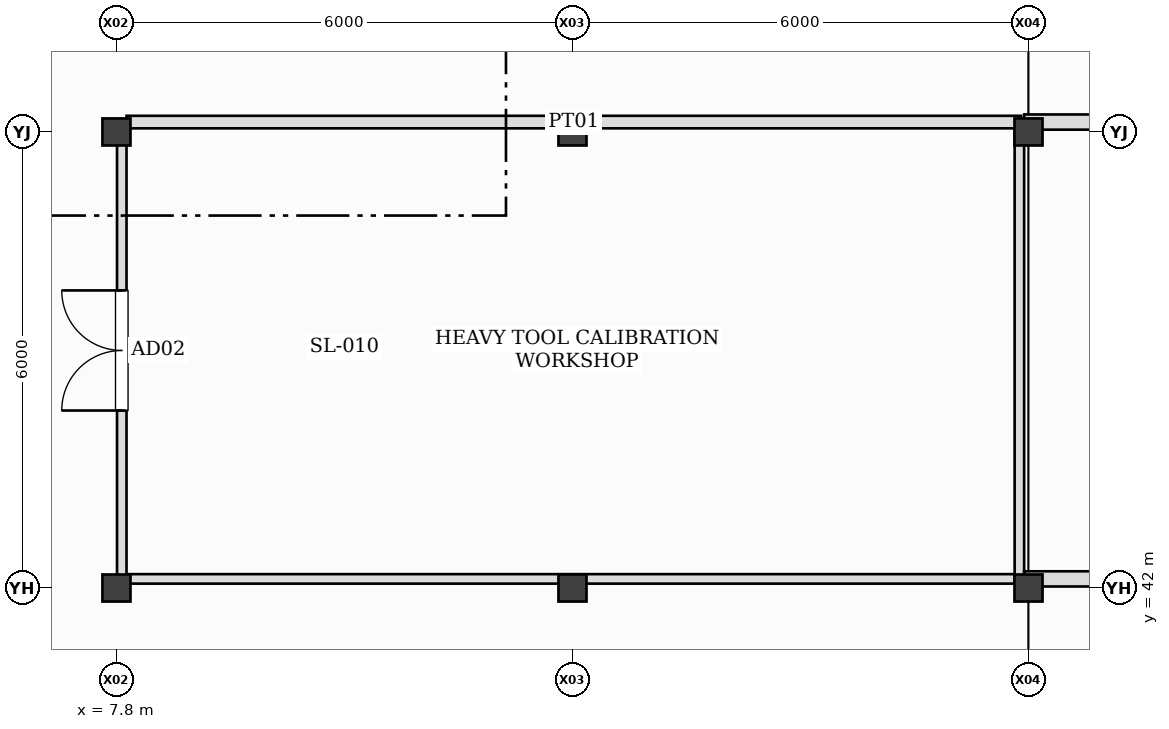
"""IFC4 building model, lengths in metres.
Left out: names, types, materials, properties, quantities, classifications, styles, units other than length and angle.
Written with IfcOpenShell. Run it as: python <this file> out.ifc"""

import sys

from ifc_helpers import new_model, si_unit, direction, frame, frame_2d, origin, origin_2d, place, context, subcontext, project, spatial, rectangle, i_section, extrude, element, fill, save


model = new_model("IFC4")
c1 = context("Model", 3, precision=1e-05, world=origin(), true_north=direction((0.0, 1.0)))
c2 = subcontext(c1, "Body", "Model", "MODEL_VIEW")
j1 = project(units=[si_unit("LENGTHUNIT", "METRE"), si_unit("PLANEANGLEUNIT", "RADIAN")], contexts=[c1])
p1 = place(None, origin())
s1 = spatial("IfcSite", under=j1, at=p1, CompositionType="ELEMENT")
p2 = place(p1, origin())
s2 = spatial("IfcBuilding", under=s1, at=p2, CompositionType="ELEMENT")
p3 = place(p2, origin())
s3 = spatial("IfcBuildingStorey", under=s2, at=p3, CompositionType="ELEMENT", Elevation=0.0)
for number, where, z_axis, x_axis in (
    (1, (7.8, 42.0, -0.41), (0.0, 0.0, 1.0), (1.0, 0.0, 0.0)),
    (2, (7.8, 48.0, -0.41), (0.0, 0.0, 1.0), (1.0, 0.0, 0.0)),
    (3, (13.8, 42.0, -0.41), (0.0, 0.0, 1.0), (1.0, 0.0, 0.0)),
    (4, (13.8, 48.0, -0.41), (0.0, 0.0, 1.0), (1.0, 0.0, 0.0)),
    (5, (19.8, 42.0, -0.41), (0.0, 0.0, 1.0), (1.0, 0.0, 0.0)),
    (6, (19.8, 48.0, -0.41), (0.0, 0.0, 1.0), (1.0, 0.0, 0.0)),
):
    element("IfcColumn", number, at=place(p3, frame(where, z_axis=z_axis, x_axis=x_axis)), inside=s3, PredefinedType="COLUMN", context=c2, shape_type="SweptSolid", body=[
        extrude(i_section(OverallWidth=0.369, OverallDepth=0.356, WebThickness=0.011, FlangeThickness=0.018, at=origin_2d()), origin(), (0.0, 0.0, 1.0), 6.41),
    ])
p4 = place(p3, frame((7.87, 42.117, 0.0), z_axis=(0.0, 0.0, 1.0), x_axis=(0.0, 1.0, 0.0)))
e7 = element("IfcWall", 7, at=p4, inside=s3, PredefinedType="PARTITIONING", context=c2, shape_type="SweptSolid", body=[
    extrude(rectangle(XDim=6.015, YDim=0.125, at=frame_2d((3.008, 0.0))), origin(), (0.0, 0.0, 1.0), 5.044),
])
p5 = place(p4, frame((2.218, 0.0, 0.0)))
e8 = element("IfcOpeningElement", 8, at=p5, cuts=e7, PredefinedType="OPENING", context=c2, shape_type="SweptSolid", body=[
    extrude(rectangle(XDim=1.58, YDim=2.2, at=frame_2d((0.79, 1.1))), frame((0.0, 0.073, 0.0), z_axis=(0.0, -1.0, 0.0), x_axis=(1.0, 0.0, 0.0)), (0.0, 0.0, 1.0), 0.145),
])
p6 = place(p3, frame((7.933, 48.13, 0.0), z_axis=(0.0, 0.0, 1.0), x_axis=(1.0, 0.0, 0.0)))
e9 = element("IfcWall", 9, at=p6, inside=s3, PredefinedType="PARTITIONING", context=c2, shape_type="SweptSolid", body=[
    extrude(rectangle(XDim=11.77, YDim=0.165, at=frame_2d((5.885, 0.0))), origin(), (0.0, 0.0, 1.0), 5.113),
])
p7 = place(p3, frame((19.68, 48.05, 0.0), z_axis=(0.0, 0.0, 1.0), x_axis=(0.0, -1.0, 0.0)))
e10 = element("IfcWall", 10, at=p7, inside=s3, PredefinedType="PARTITIONING", context=c2, shape_type="SweptSolid", body=[
    extrude(rectangle(XDim=5.933, YDim=0.125, at=frame_2d((2.966, 0.0))), origin(), (0.0, 0.0, 1.0), 5.044),
])
p8 = place(p3, frame((19.617, 42.12, 0.0), z_axis=(0.0, 0.0, 1.0), x_axis=(-1.0, 0.0, 0.0)))
e11 = element("IfcWall", 11, at=p8, inside=s3, PredefinedType="PARTITIONING", context=c2, shape_type="SweptSolid", body=[
    extrude(rectangle(XDim=11.685, YDim=0.125, at=frame_2d((5.842, 0.0))), origin(), (0.0, 0.0, 1.0), 5.113),
])
p9 = place(p3, frame((19.742, 48.13, 0.0), z_axis=(0.0, 0.0, 1.0), x_axis=(1.0, 0.0, 0.0)))
e12 = element("IfcWall", 12, at=p9, inside=s3, PredefinedType="PARTITIONING", context=c2, shape_type="SweptSolid", body=[
    extrude(rectangle(XDim=11.978, YDim=0.2, at=frame_2d((5.989, 0.0))), origin(), (0.0, 0.0, 1.0), 5.113),
])
p10 = place(p9, frame((3.968, 0.0, 0.0)))
e13 = element("IfcOpeningElement", 13, at=p10, cuts=e12, PredefinedType="OPENING", context=c2, shape_type="SweptSolid", body=[
    extrude(rectangle(XDim=1.13, YDim=2.18, at=frame_2d((0.565, 1.09))), frame((0.0, 0.11, 0.0), z_axis=(0.0, -1.0, 0.0), x_axis=(1.0, 0.0, 0.0)), (0.0, 0.0, 1.0), 0.22),
])
p11 = place(p3, frame((31.6, 42.12, 0.0), z_axis=(0.0, 0.0, 1.0), x_axis=(-1.0, 0.0, 0.0)))
e14 = element("IfcWall", 14, at=p11, inside=s3, PredefinedType="PARTITIONING", context=c2, shape_type="SweptSolid", body=[
    extrude(rectangle(XDim=11.858, YDim=0.2, at=frame_2d((5.929, 0.0))), origin(), (0.0, 0.0, 1.0), 5.113),
])
p12 = place(p5, frame((1.58, 0.0, 0.0), z_axis=(0.0, 0.0, 1.0), x_axis=(-1.0, 0.0, 0.0)))
e15 = element("IfcDoor", 15, at=p12, inside=s3, OperationType="DOUBLE_DOOR_SINGLE_SWING", PredefinedType="DOOR", context=c2, shape_type="SweptSolid", body=[
    extrude(rectangle(XDim=1.58, YDim=2.2, at=frame_2d((0.79, 1.1))), frame((0.0, 0.025, 0.0), z_axis=(0.0, -1.0, 0.0), x_axis=(1.0, 0.0, 0.0)), (0.0, 0.0, 1.0), 0.05),
])
fill(e8, e15)
save(model, sys.argv[1])
